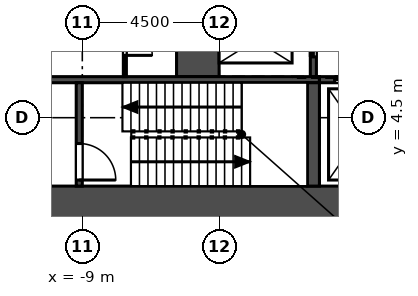
"""IFC4 building model, lengths in metres.
Left out: names, types, materials, properties, quantities, classifications, styles, units other than length and angle.
Written with IfcOpenShell. Run it as: python <this file> out.ifc"""

import sys

from ifc_helpers import new_model, si_unit, direction, frame, frame_2d, origin, place, context, subcontext, project, spatial, rectangle, extrude, element, fill, save


model = new_model("IFC4")
c1 = context("Model", 3, precision=1e-05, world=origin(), true_north=direction((0.0, 1.0)))
c2 = subcontext(c1, "Body", "Model", "MODEL_VIEW")
j1 = project(units=[si_unit("LENGTHUNIT", "METRE"), si_unit("PLANEANGLEUNIT", "RADIAN")], contexts=[c1])
p1 = place(None, origin())
s1 = spatial("IfcSite", under=j1, at=p1, CompositionType="ELEMENT")
p2 = place(p1, origin())
s2 = spatial("IfcBuilding", under=s1, at=p2, CompositionType="ELEMENT")
p3 = place(p2, frame((0.0, 0.0, 25.0)))
s3 = spatial("IfcBuildingStorey", under=s2, at=p3, CompositionType="ELEMENT", Elevation=25.0)
p4 = place(p3, frame((-14.0, 1.55, 0.0), z_axis=(0.0, 0.0, 1.0), x_axis=(1.0, 0.0, 0.0)))
e1 = element("IfcWall", 1, at=p4, inside=s3, PredefinedType="SHEAR", context=c2, shape_type="SweptSolid", body=[
    extrude(rectangle(XDim=28.0, YDim=1.4, at=frame_2d((14.0, 0.0))), origin(), (0.0, 0.0, 1.0), 4.5),
])
p5 = place(p3, frame((-1.4, 5.85, -2.0), z_axis=(0.0, 0.0, 1.0), x_axis=(0.0, 1.0, 0.0)))
e2 = element("IfcWall", 2, at=p5, inside=s3, PredefinedType="SOLIDWALL", context=c2, shape_type="SweptSolid", body=[
    extrude(rectangle(XDim=11.75, YDim=0.2, at=frame_2d((5.875, 0.0))), origin(), (0.0, 0.0, 1.0), 6.2),
])
p6 = place(p5, frame((3.2, 0.0, 2.0)))
e3 = element("IfcOpeningElement", 3, at=p6, cuts=e2, PredefinedType="OPENING", context=c2, shape_type="SweptSolid", body=[
    extrude(rectangle(XDim=1.2, YDim=2.1, at=frame_2d((0.6, 1.05))), frame((0.0, 0.11, 0.0), z_axis=(0.0, -1.0, 0.0), x_axis=(1.0, 0.0, 0.0)), (0.0, 0.0, 1.0), 0.22),
])
p7 = place(p5, frame((0.65, 0.0, 2.0)))
e4 = element("IfcOpeningElement", 4, at=p7, cuts=e2, PredefinedType="OPENING", context=c2, shape_type="SweptSolid", body=[
    extrude(rectangle(XDim=1.1, YDim=2.1, at=frame_2d((0.55, 1.05))), frame((0.0, 0.11, 0.0), z_axis=(0.0, -1.0, 0.0), x_axis=(1.0, 0.0, 0.0)), (0.0, 0.0, 1.0), 0.22),
])
p8 = place(p3, frame((-5.2, 5.85, -2.0), z_axis=(0.0, 0.0, 1.0), x_axis=(0.0, 1.0, 0.0)))
e5 = element("IfcWall", 5, at=p8, inside=s3, PredefinedType="SOLIDWALL", context=c2, shape_type="SweptSolid", body=[
    extrude(rectangle(XDim=2.4, YDim=1.4, at=frame_2d((1.2, 0.0))), origin(), (0.0, 0.0, 1.0), 6.2),
])
p9 = place(p3, frame((-12.6, 5.75, -2.0), z_axis=(0.0, 0.0, 1.0), x_axis=(1.0, 0.0, 0.0)))
e6 = element("IfcWall", 6, at=p9, inside=s3, PredefinedType="SOLIDWALL", context=c2, shape_type="SweptSolid", body=[
    extrude(rectangle(XDim=11.4, YDim=0.2, at=frame_2d((5.7, 0.0))), origin(), (0.0, 0.0, 1.0), 6.2),
])
p10 = place(p3, frame((-1.2, 5.75, -2.0), z_axis=(0.0, 0.0, 1.0), x_axis=(1.0, 0.0, 0.0)))
e7 = element("IfcWall", 7, at=p10, inside=s3, PredefinedType="SOLIDWALL", context=c2, shape_type="SweptSolid", body=[
    extrude(rectangle(XDim=2.4, YDim=0.2, at=frame_2d((1.2, 0.0))), origin(), (0.0, 0.0, 1.0), 6.2),
])
p11 = place(p10, frame((0.5, 0.0, 2.0)))
e8 = element("IfcOpeningElement", 8, at=p11, cuts=e7, PredefinedType="OPENING", context=c2, shape_type="SweptSolid", body=[
    extrude(rectangle(XDim=1.4, YDim=2.1, at=frame_2d((0.7, 1.05))), frame((0.0, 0.11, 0.0), z_axis=(0.0, -1.0, 0.0), x_axis=(1.0, 0.0, 0.0)), (0.0, 0.0, 1.0), 0.22),
])
p12 = place(p3, frame((-9.1, 2.25, -2.0), z_axis=(0.0, 0.0, 1.0), x_axis=(0.0, 1.0, 0.0)))
e9 = element("IfcWall", 9, at=p12, inside=s3, PredefinedType="SOLIDWALL", context=c2, shape_type="SweptSolid", body=[
    extrude(rectangle(XDim=3.4, YDim=0.2, at=frame_2d((1.7, 0.0))), origin(), (0.0, 0.0, 1.0), 6.2),
])
p13 = place(p12, frame((0.2, 0.0, 2.0)))
e10 = element("IfcOpeningElement", 10, at=p13, cuts=e9, PredefinedType="OPENING", context=c2, shape_type="SweptSolid", body=[
    extrude(rectangle(XDim=1.2, YDim=2.1, at=frame_2d((0.6, 1.05))), frame((0.0, 0.11, 0.0), z_axis=(0.0, -1.0, 0.0), x_axis=(1.0, 0.0, 0.0)), (0.0, 0.0, 1.0), 0.22),
])
p14 = place(p3, frame((-1.4, 2.25, -2.0), z_axis=(0.0, 0.0, 1.0), x_axis=(0.0, 1.0, 0.0)))
e11 = element("IfcWall", 11, at=p14, inside=s3, PredefinedType="SOLIDWALL", context=c2, shape_type="SweptSolid", body=[
    extrude(rectangle(XDim=3.4, YDim=0.4, at=frame_2d((1.7, 0.0))), origin(), (0.0, 0.0, 1.0), 6.2),
])
p15 = place(p3, frame((-7.6, 5.85, 0.0), z_axis=(0.0, 0.0, 1.0), x_axis=(0.0, 1.0, 0.0)))
e12 = element("IfcWall", 12, at=p15, inside=s3, PredefinedType="PARTITIONING", context=c2, shape_type="SweptSolid", body=[
    extrude(rectangle(XDim=2.4, YDim=0.1, at=frame_2d((1.2, 0.0))), origin(), (0.0, 0.0, 1.0), 4.2),
])
p16 = place(p15, frame((0.7, 0.0, 0.0)))
e13 = element("IfcOpeningElement", 13, at=p16, cuts=e12, PredefinedType="OPENING", context=c2, shape_type="SweptSolid", body=[
    extrude(rectangle(XDim=0.9, YDim=2.1, at=frame_2d((0.45, 1.05))), frame((0.0, 0.06, 0.0), z_axis=(0.0, -1.0, 0.0), x_axis=(1.0, 0.0, 0.0)), (0.0, 0.0, 1.0), 0.12),
])
p17 = place(p7, origin())
e14 = element("IfcDoor", 14, at=p17, inside=s3, OperationType="SLIDING_TO_RIGHT", PredefinedType="DOOR", context=c2, shape_type="SweptSolid", body=[
    extrude(rectangle(XDim=1.1, YDim=2.1, at=frame_2d((0.55, 1.05))), frame((0.0, 0.025, 0.0), z_axis=(0.0, -1.0, 0.0), x_axis=(1.0, 0.0, 0.0)), (0.0, 0.0, 1.0), 0.05),
])
fill(e4, e14)
p18 = place(p11, origin())
e15 = element("IfcDoor", 15, at=p18, inside=s3, OperationType="SLIDING_TO_LEFT", PredefinedType="DOOR", context=c2, shape_type="SweptSolid", body=[
    extrude(rectangle(XDim=1.4, YDim=2.1, at=frame_2d((0.7, 1.05))), frame((0.0, 0.025, 0.0), z_axis=(0.0, -1.0, 0.0), x_axis=(1.0, 0.0, 0.0)), (0.0, 0.0, 1.0), 0.05),
])
fill(e8, e15)
p19 = place(p16, frame((0.9, 0.0, 0.0), z_axis=(0.0, 0.0, 1.0), x_axis=(-1.0, 0.0, 0.0)))
e16 = element("IfcDoor", 16, at=p19, inside=s3, OperationType="SINGLE_SWING_RIGHT", PredefinedType="DOOR", context=c2, shape_type="SweptSolid", body=[
    extrude(rectangle(XDim=0.9, YDim=2.1, at=frame_2d((0.45, 1.05))), frame((0.0, 0.025, 0.0), z_axis=(0.0, -1.0, 0.0), x_axis=(1.0, 0.0, 0.0)), (0.0, 0.0, 1.0), 0.05),
])
fill(e13, e16)
p20 = place(p13, frame((1.2, 0.0, 0.0), z_axis=(0.0, 0.0, 1.0), x_axis=(-1.0, 0.0, 0.0)))
e17 = element("IfcDoor", 17, at=p20, inside=s3, OperationType="SINGLE_SWING_RIGHT", PredefinedType="DOOR", context=c2, shape_type="SweptSolid", body=[
    extrude(rectangle(XDim=1.2, YDim=2.1, at=frame_2d((0.6, 1.05))), frame((0.0, 0.025, 0.0), z_axis=(0.0, -1.0, 0.0), x_axis=(1.0, 0.0, 0.0)), (0.0, 0.0, 1.0), 0.05),
])
fill(e10, e17)
save(model, sys.argv[1])
